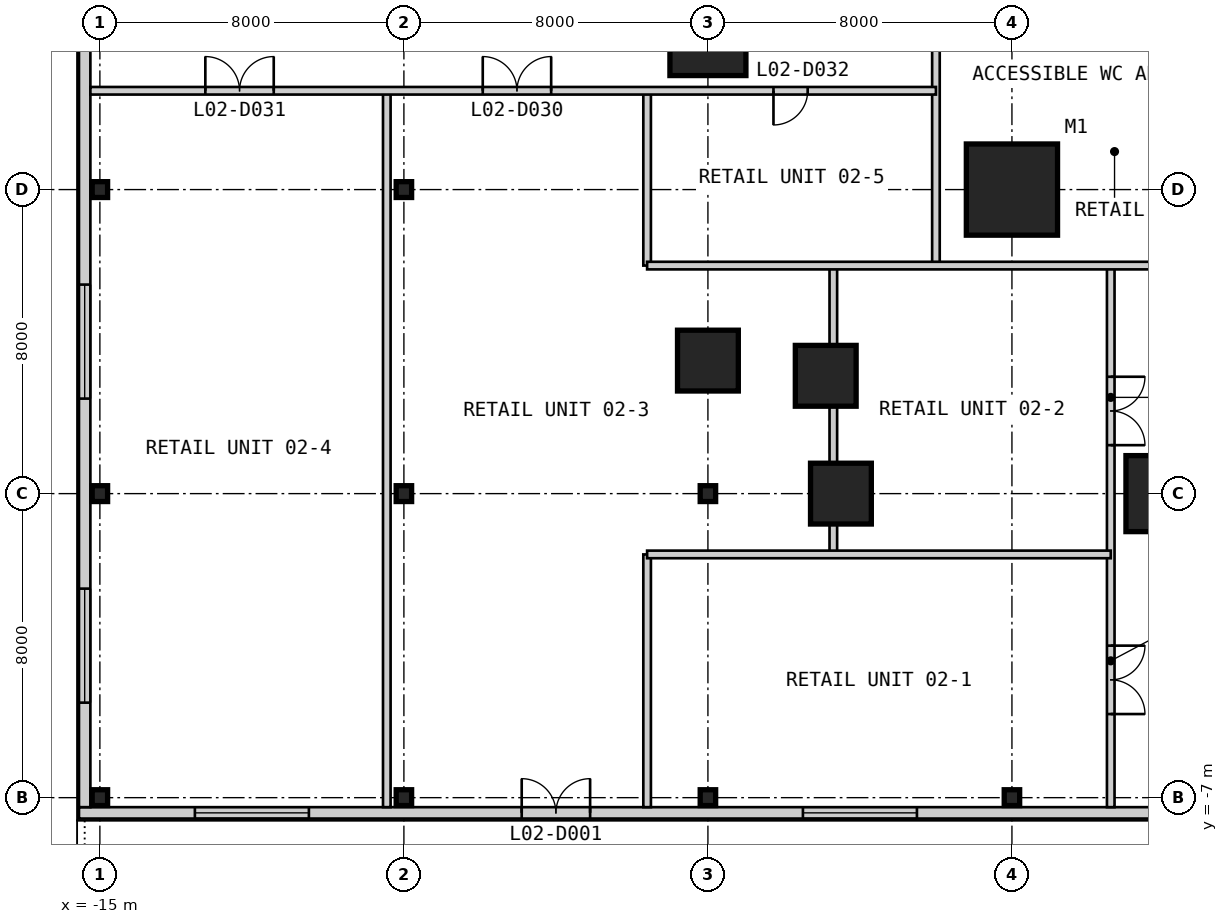
"""IFC4 building model, lengths in metres.
Left out: names, types, materials, properties, quantities, classifications, styles, units other than length and angle.
Written with IfcOpenShell. Run it as: python <this file> out.ifc"""

import sys

from ifc_helpers import new_model, si_unit, direction, frame, frame_2d, origin, origin_2d, place, context, subcontext, project, spatial, rectangle, i_section, extrude, element, fill, save


model = new_model("IFC4")
c1 = context("Model", 3, precision=1e-05, world=origin(), true_north=direction((0.0, 1.0)))
c2 = subcontext(c1, "Body", "Model", "MODEL_VIEW")
j1 = project(units=[si_unit("LENGTHUNIT", "METRE"), si_unit("PLANEANGLEUNIT", "RADIAN")], contexts=[c1])
p1 = place(None, origin())
s1 = spatial("IfcSite", under=j1, at=p1, CompositionType="ELEMENT")
p2 = place(p1, origin())
s2 = spatial("IfcBuilding", under=s1, at=p2, CompositionType="ELEMENT")
p3 = place(p2, frame((0.0, 0.0, 11.8)))
s3 = spatial("IfcBuildingStorey", under=s2, at=p3, CompositionType="ELEMENT", Elevation=11.8)
p4 = place(p3, frame((9.0, 9.0, 0.0), z_axis=(0.0, 0.0, 1.0), x_axis=(1.0, 0.0, 0.0)))
e1 = element("IfcColumn", 1, at=p4, inside=s3, PredefinedType="COLUMN", context=c2, shape_type="SweptSolid", body=[
    extrude(rectangle(XDim=2.4, YDim=2.4, at=origin_2d()), origin(), (0.0, 0.0, 1.0), 4.8),
])
p5 = place(p3, frame((4.5, 1.0, 0.0), z_axis=(0.0, 0.0, 1.0), x_axis=(1.0, 0.0, 0.0)))
e2 = element("IfcColumn", 2, at=p5, inside=s3, PredefinedType="COLUMN", context=c2, shape_type="SweptSolid", body=[
    extrude(rectangle(XDim=1.6, YDim=1.6, at=origin_2d()), origin(), (0.0, 0.0, 1.0), 4.8),
])
for number, where, z_axis, x_axis in (
    (3, (13.0, 1.0, 0.0), (0.0, 0.0, 1.0), (1.0, 0.0, 0.0)),
    (4, (1.0, 13.0, 0.0), (0.0, 0.0, 1.0), (1.0, 0.0, 0.0)),
):
    element("IfcColumn", number, at=place(p3, frame(where, z_axis=z_axis, x_axis=x_axis)), inside=s3, PredefinedType="COLUMN", context=c2, shape_type="SweptSolid", body=[
        extrude(rectangle(XDim=2.0, YDim=2.0, at=origin_2d()), origin(), (0.0, 0.0, 1.0), 4.8),
    ])
for number, where, z_axis, x_axis in (
    (5, (1.0, 4.5, 0.0), (0.0, 0.0, 1.0), (1.0, 0.0, 0.0)),
    (6, (4.1, 4.1, 0.0), (0.0, 0.0, 1.0), (1.0, 0.0, 0.0)),
):
    element("IfcColumn", number, at=place(p3, frame(where, z_axis=z_axis, x_axis=x_axis)), inside=s3, PredefinedType="COLUMN", context=c2, shape_type="SweptSolid", body=[
        extrude(rectangle(XDim=1.6, YDim=1.6, at=origin_2d()), origin(), (0.0, 0.0, 1.0), 4.8),
    ])
for number, where, z_axis, x_axis in (
    (7, (-15.0, -7.0, 0.0), (0.0, 0.0, 1.0), (1.0, 0.0, 0.0)),
    (8, (-15.0, 1.0, 0.0), (0.0, 0.0, 1.0), (1.0, 0.0, 0.0)),
    (9, (-15.0, 9.0, 0.0), (0.0, 0.0, 1.0), (1.0, 0.0, 0.0)),
    (10, (-7.0, -7.0, 0.0), (0.0, 0.0, 1.0), (1.0, 0.0, 0.0)),
    (11, (-7.0, 1.0, 0.0), (0.0, 0.0, 1.0), (1.0, 0.0, 0.0)),
    (12, (-7.0, 9.0, 0.0), (0.0, 0.0, 1.0), (1.0, 0.0, 0.0)),
    (13, (1.0, -7.0, 0.0), (0.0, 0.0, 1.0), (1.0, 0.0, 0.0)),
    (14, (1.0, 1.0, 0.0), (0.0, 0.0, 1.0), (1.0, 0.0, 0.0)),
    (15, (9.0, -7.0, 0.0), (0.0, 0.0, 1.0), (1.0, 0.0, 0.0)),
):
    element("IfcColumn", number, at=place(p3, frame(where, z_axis=z_axis, x_axis=x_axis)), inside=s3, PredefinedType="COLUMN", context=c2, shape_type="SweptSolid", body=[
        extrude(i_section(OverallWidth=0.406, OverallDepth=0.417, WebThickness=0.03, FlangeThickness=0.048, at=origin_2d()), origin(), (0.0, 0.0, 1.0), 4.8),
    ])
p6 = place(p3, frame((-15.55, -7.4, 0.0), z_axis=(0.0, 0.0, 1.0), x_axis=(1.0, 0.0, 0.0)))
e16 = element("IfcWall", 16, at=p6, inside=s3, PredefinedType="SOLIDWALL", context=c2, shape_type="SweptSolid", body=[
    extrude(rectangle(XDim=73.1, YDim=0.3, at=frame_2d((36.55, 0.0))), origin(), (0.0, 0.0, 1.0), 4.5),
])
p7 = place(p6, frame((11.65, 0.0, 0.0)))
e17 = element("IfcOpeningElement", 17, at=p7, cuts=e16, PredefinedType="OPENING", context=c2, shape_type="SweptSolid", body=[
    extrude(rectangle(XDim=1.8, YDim=2.4, at=frame_2d((0.9, 1.2))), frame((0.0, 0.16, 0.0), z_axis=(0.0, -1.0, 0.0), x_axis=(1.0, 0.0, 0.0)), (0.0, 0.0, 1.0), 0.32),
])
p8 = place(p6, frame((45.65, 0.0, 0.0)))
e18 = element("IfcOpeningElement", 18, at=p8, cuts=e16, PredefinedType="OPENING", context=c2, shape_type="SweptSolid", body=[
    extrude(rectangle(XDim=1.8, YDim=2.4, at=frame_2d((0.9, 1.2))), frame((0.0, 0.16, 0.0), z_axis=(0.0, -1.0, 0.0), x_axis=(1.0, 0.0, 0.0)), (0.0, 0.0, 1.0), 0.32),
])
p9 = place(p6, frame((3.05, 0.0, 0.9)))
e19 = element("IfcOpeningElement", 19, at=p9, cuts=e16, PredefinedType="OPENING", context=c2, shape_type="SweptSolid", body=[
    extrude(rectangle(XDim=3.0, YDim=2.4, at=frame_2d((1.5, 1.2))), frame((0.0, 0.16, 0.0), z_axis=(0.0, -1.0, 0.0), x_axis=(1.0, 0.0, 0.0)), (0.0, 0.0, 1.0), 0.32),
])
p10 = place(p6, frame((19.05, 0.0, 0.9)))
e20 = element("IfcOpeningElement", 20, at=p10, cuts=e16, PredefinedType="OPENING", context=c2, shape_type="SweptSolid", body=[
    extrude(rectangle(XDim=3.0, YDim=2.4, at=frame_2d((1.5, 1.2))), frame((0.0, 0.16, 0.0), z_axis=(0.0, -1.0, 0.0), x_axis=(1.0, 0.0, 0.0)), (0.0, 0.0, 1.0), 0.32),
])
p11 = place(p6, frame((33.05, 0.0, 0.9)))
e21 = element("IfcOpeningElement", 21, at=p11, cuts=e16, PredefinedType="OPENING", context=c2, shape_type="SweptSolid", body=[
    extrude(rectangle(XDim=3.0, YDim=2.4, at=frame_2d((1.5, 1.2))), frame((0.0, 0.16, 0.0), z_axis=(0.0, -1.0, 0.0), x_axis=(1.0, 0.0, 0.0)), (0.0, 0.0, 1.0), 0.32),
])
p12 = place(p6, frame((53.55, 0.0, 0.9)))
e22 = element("IfcOpeningElement", 22, at=p12, cuts=e16, PredefinedType="OPENING", context=c2, shape_type="SweptSolid", body=[
    extrude(rectangle(XDim=3.0, YDim=2.4, at=frame_2d((1.5, 1.2))), frame((0.0, 0.16, 0.0), z_axis=(0.0, -1.0, 0.0), x_axis=(1.0, 0.0, 0.0)), (0.0, 0.0, 1.0), 0.32),
])
p13 = place(p6, frame((59.55, 0.0, 0.9)))
e23 = element("IfcOpeningElement", 23, at=p13, cuts=e16, PredefinedType="OPENING", context=c2, shape_type="SweptSolid", body=[
    extrude(rectangle(XDim=3.0, YDim=2.4, at=frame_2d((1.5, 1.2))), frame((0.0, 0.16, 0.0), z_axis=(0.0, -1.0, 0.0), x_axis=(1.0, 0.0, 0.0)), (0.0, 0.0, 1.0), 0.32),
])
p14 = place(p6, frame((67.05, 0.0, 0.9)))
e24 = element("IfcOpeningElement", 24, at=p14, cuts=e16, PredefinedType="OPENING", context=c2, shape_type="SweptSolid", body=[
    extrude(rectangle(XDim=3.0, YDim=2.4, at=frame_2d((1.5, 1.2))), frame((0.0, 0.16, 0.0), z_axis=(0.0, -1.0, 0.0), x_axis=(1.0, 0.0, 0.0)), (0.0, 0.0, 1.0), 0.32),
])
p15 = place(p3, frame((-15.4, 65.25, 0.0), z_axis=(0.0, 0.0, 1.0), x_axis=(0.0, -1.0, 0.0)))
e25 = element("IfcWall", 25, at=p15, inside=s3, PredefinedType="SOLIDWALL", context=c2, shape_type="SweptSolid", body=[
    extrude(rectangle(XDim=72.5, YDim=0.3, at=frame_2d((36.25, 0.0))), origin(), (0.0, 0.0, 1.0), 4.5),
])
p16 = place(p15, frame((66.75, 0.0, 0.9)))
e26 = element("IfcOpeningElement", 26, at=p16, cuts=e25, PredefinedType="OPENING", context=c2, shape_type="SweptSolid", body=[
    extrude(rectangle(XDim=3.0, YDim=2.4, at=frame_2d((1.5, 1.2))), frame((0.0, 0.16, 0.0), z_axis=(0.0, -1.0, 0.0), x_axis=(1.0, 0.0, 0.0)), (0.0, 0.0, 1.0), 0.32),
])
p17 = place(p15, frame((58.75, 0.0, 0.9)))
e27 = element("IfcOpeningElement", 27, at=p17, cuts=e25, PredefinedType="OPENING", context=c2, shape_type="SweptSolid", body=[
    extrude(rectangle(XDim=3.0, YDim=2.4, at=frame_2d((1.5, 1.2))), frame((0.0, 0.16, 0.0), z_axis=(0.0, -1.0, 0.0), x_axis=(1.0, 0.0, 0.0)), (0.0, 0.0, 1.0), 0.32),
])
p18 = place(p15, frame((44.75, 0.0, 0.9)))
e28 = element("IfcOpeningElement", 28, at=p18, cuts=e25, PredefinedType="OPENING", context=c2, shape_type="SweptSolid", body=[
    extrude(rectangle(XDim=3.0, YDim=2.4, at=frame_2d((1.5, 1.2))), frame((0.0, 0.16, 0.0), z_axis=(0.0, -1.0, 0.0), x_axis=(1.0, 0.0, 0.0)), (0.0, 0.0, 1.0), 0.32),
])
p19 = place(p15, frame((32.75, 0.0, 0.9)))
e29 = element("IfcOpeningElement", 29, at=p19, cuts=e25, PredefinedType="OPENING", context=c2, shape_type="SweptSolid", body=[
    extrude(rectangle(XDim=3.0, YDim=2.4, at=frame_2d((1.5, 1.2))), frame((0.0, 0.16, 0.0), z_axis=(0.0, -1.0, 0.0), x_axis=(1.0, 0.0, 0.0)), (0.0, 0.0, 1.0), 0.32),
])
p20 = place(p15, frame((24.25, 0.0, 0.9)))
e30 = element("IfcOpeningElement", 30, at=p20, cuts=e25, PredefinedType="OPENING", context=c2, shape_type="SweptSolid", body=[
    extrude(rectangle(XDim=3.0, YDim=2.4, at=frame_2d((1.5, 1.2))), frame((0.0, 0.16, 0.0), z_axis=(0.0, -1.0, 0.0), x_axis=(1.0, 0.0, 0.0)), (0.0, 0.0, 1.0), 0.32),
])
p21 = place(p15, frame((18.25, 0.0, 0.9)))
e31 = element("IfcOpeningElement", 31, at=p21, cuts=e25, PredefinedType="OPENING", context=c2, shape_type="SweptSolid", body=[
    extrude(rectangle(XDim=3.0, YDim=2.4, at=frame_2d((1.5, 1.2))), frame((0.0, 0.16, 0.0), z_axis=(0.0, -1.0, 0.0), x_axis=(1.0, 0.0, 0.0)), (0.0, 0.0, 1.0), 0.32),
])
p22 = place(p15, frame((10.75, 0.0, 0.9)))
e32 = element("IfcOpeningElement", 32, at=p22, cuts=e25, PredefinedType="OPENING", context=c2, shape_type="SweptSolid", body=[
    extrude(rectangle(XDim=3.0, YDim=2.4, at=frame_2d((1.5, 1.2))), frame((0.0, 0.16, 0.0), z_axis=(0.0, -1.0, 0.0), x_axis=(1.0, 0.0, 0.0)), (0.0, 0.0, 1.0), 0.32),
])
p23 = place(p15, frame((2.75, 0.0, 0.9)))
e33 = element("IfcOpeningElement", 33, at=p23, cuts=e25, PredefinedType="OPENING", context=c2, shape_type="SweptSolid", body=[
    extrude(rectangle(XDim=3.0, YDim=2.4, at=frame_2d((1.5, 1.2))), frame((0.0, 0.16, 0.0), z_axis=(0.0, -1.0, 0.0), x_axis=(1.0, 0.0, 0.0)), (0.0, 0.0, 1.0), 0.32),
])
p24 = place(p3, frame((-7.45, -7.25, 0.0), z_axis=(0.0, 0.0, 1.0), x_axis=(0.0, 1.0, 0.0)))
e34 = element("IfcWall", 34, at=p24, inside=s3, PredefinedType="PARTITIONING", context=c2, shape_type="SweptSolid", body=[
    extrude(rectangle(XDim=18.85, YDim=0.2, at=frame_2d((9.425, 0.0))), origin(), (0.0, 0.0, 1.0), 4.5),
])
p25 = place(p3, frame((-0.6, -7.25, 0.0), z_axis=(0.0, 0.0, 1.0), x_axis=(0.0, 1.0, 0.0)))
e35 = element("IfcWall", 35, at=p25, inside=s3, PredefinedType="PARTITIONING", context=c2, shape_type="SweptSolid", body=[
    extrude(rectangle(XDim=6.65, YDim=0.2, at=frame_2d((3.325, 0.0))), origin(), (0.0, 0.0, 1.0), 4.5),
])
p26 = place(p3, frame((-0.6, 7.0, 0.0), z_axis=(0.0, 0.0, 1.0), x_axis=(0.0, 1.0, 0.0)))
e36 = element("IfcWall", 36, at=p26, inside=s3, PredefinedType="PARTITIONING", context=c2, shape_type="SweptSolid", body=[
    extrude(rectangle(XDim=4.6, YDim=0.2, at=frame_2d((2.3, 0.0))), origin(), (0.0, 0.0, 1.0), 4.5),
])
p27 = place(p3, frame((4.3, -0.6, 0.0), z_axis=(0.0, 0.0, 1.0), x_axis=(0.0, 1.0, 0.0)))
e37 = element("IfcWall", 37, at=p27, inside=s3, PredefinedType="PARTITIONING", context=c2, shape_type="SweptSolid", body=[
    extrude(rectangle(XDim=0.8, YDim=0.2, at=frame_2d((0.4, 0.0))), origin(), (0.0, 0.0, 1.0), 4.5),
])
p28 = place(p3, frame((4.3, 1.8, 0.0), z_axis=(0.0, 0.0, 1.0), x_axis=(0.0, 1.0, 0.0)))
e38 = element("IfcWall", 38, at=p28, inside=s3, PredefinedType="PARTITIONING", context=c2, shape_type="SweptSolid", body=[
    extrude(rectangle(XDim=1.5, YDim=0.2, at=frame_2d((0.75, 0.0))), origin(), (0.0, 0.0, 1.0), 3.65),
])
p29 = place(p3, frame((4.3, 4.9, 0.0), z_axis=(0.0, 0.0, 1.0), x_axis=(0.0, 1.0, 0.0)))
e39 = element("IfcWall", 39, at=p29, inside=s3, PredefinedType="PARTITIONING", context=c2, shape_type="SweptSolid", body=[
    extrude(rectangle(XDim=2.1, YDim=0.2, at=frame_2d((1.05, 0.0))), origin(), (0.0, 0.0, 1.0), 4.5),
])
p30 = place(p3, frame((7.0, 7.0, 0.0), z_axis=(0.0, 0.0, 1.0), x_axis=(0.0, 1.0, 0.0)))
e40 = element("IfcWall", 40, at=p30, inside=s3, PredefinedType="PARTITIONING", context=c2, shape_type="SweptSolid", body=[
    extrude(rectangle(XDim=6.0, YDim=0.2, at=frame_2d((3.0, 0.0))), origin(), (0.0, 0.0, 1.0), 4.5),
])
p31 = place(p3, frame((11.6, -7.25, 0.0), z_axis=(0.0, 0.0, 1.0), x_axis=(0.0, 1.0, 0.0)))
e41 = element("IfcWall", 41, at=p31, inside=s3, PredefinedType="PARTITIONING", context=c2, shape_type="SweptSolid", body=[
    extrude(rectangle(XDim=14.25, YDim=0.2, at=frame_2d((7.125, 0.0))), origin(), (0.0, 0.0, 1.0), 4.5),
])
p32 = place(p31, frame((2.45, 0.0, 0.0)))
e42 = element("IfcOpeningElement", 42, at=p32, cuts=e41, PredefinedType="OPENING", context=c2, shape_type="SweptSolid", body=[
    extrude(rectangle(XDim=1.8, YDim=2.4, at=frame_2d((0.9, 1.2))), frame((0.0, 0.11, 0.0), z_axis=(0.0, -1.0, 0.0), x_axis=(1.0, 0.0, 0.0)), (0.0, 0.0, 1.0), 0.22),
])
p33 = place(p31, frame((9.525, 0.0, 0.0)))
e43 = element("IfcOpeningElement", 43, at=p33, cuts=e41, PredefinedType="OPENING", context=c2, shape_type="SweptSolid", body=[
    extrude(rectangle(XDim=1.8, YDim=2.4, at=frame_2d((0.9, 1.2))), frame((0.0, 0.11, 0.0), z_axis=(0.0, -1.0, 0.0), x_axis=(1.0, 0.0, 0.0)), (0.0, 0.0, 1.0), 0.22),
])
p34 = place(p3, frame((-0.6, -0.6, 0.0), z_axis=(0.0, 0.0, 1.0), x_axis=(1.0, 0.0, 0.0)))
e44 = element("IfcWall", 44, at=p34, inside=s3, PredefinedType="PARTITIONING", context=c2, shape_type="SweptSolid", body=[
    extrude(rectangle(XDim=12.2, YDim=0.2, at=frame_2d((6.1, 0.0))), origin(), (0.0, 0.0, 1.0), 4.5),
])
p35 = place(p3, frame((-0.6, 7.0, 0.0), z_axis=(0.0, 0.0, 1.0), x_axis=(1.0, 0.0, 0.0)))
e45 = element("IfcWall", 45, at=p35, inside=s3, PredefinedType="PARTITIONING", context=c2, shape_type="SweptSolid", body=[
    extrude(rectangle(XDim=17.0, YDim=0.2, at=frame_2d((8.5, 0.0))), origin(), (0.0, 0.0, 1.0), 4.5),
])
p36 = place(p35, frame((14.125, 0.0, 0.0)))
e46 = element("IfcOpeningElement", 46, at=p36, cuts=e45, PredefinedType="OPENING", context=c2, shape_type="SweptSolid", body=[
    extrude(rectangle(XDim=0.9, YDim=2.2, at=frame_2d((0.45, 1.1))), frame((0.0, 0.11, 0.0), z_axis=(0.0, -1.0, 0.0), x_axis=(1.0, 0.0, 0.0)), (0.0, 0.0, 1.0), 0.22),
])
p37 = place(p3, frame((-15.25, 11.6, 0.0), z_axis=(0.0, 0.0, 1.0), x_axis=(1.0, 0.0, 0.0)))
e47 = element("IfcWall", 47, at=p37, inside=s3, PredefinedType="PARTITIONING", context=c2, shape_type="SweptSolid", body=[
    extrude(rectangle(XDim=22.25, YDim=0.2, at=frame_2d((11.125, 0.0))), origin(), (0.0, 0.0, 1.0), 4.5),
])
p38 = place(p37, frame((10.325, 0.0, 0.0)))
e48 = element("IfcOpeningElement", 48, at=p38, cuts=e47, PredefinedType="OPENING", context=c2, shape_type="SweptSolid", body=[
    extrude(rectangle(XDim=1.8, YDim=2.4, at=frame_2d((0.9, 1.2))), frame((0.0, 0.11, 0.0), z_axis=(0.0, -1.0, 0.0), x_axis=(1.0, 0.0, 0.0)), (0.0, 0.0, 1.0), 0.22),
])
p39 = place(p37, frame((3.025, 0.0, 0.0)))
e49 = element("IfcOpeningElement", 49, at=p39, cuts=e47, PredefinedType="OPENING", context=c2, shape_type="SweptSolid", body=[
    extrude(rectangle(XDim=1.8, YDim=2.4, at=frame_2d((0.9, 1.2))), frame((0.0, 0.11, 0.0), z_axis=(0.0, -1.0, 0.0), x_axis=(1.0, 0.0, 0.0)), (0.0, 0.0, 1.0), 0.22),
])
p40 = place(p37, frame((17.975, 0.0, 0.0)))
e50 = element("IfcOpeningElement", 50, at=p40, cuts=e47, PredefinedType="OPENING", context=c2, shape_type="SweptSolid", body=[
    extrude(rectangle(XDim=0.9, YDim=2.2, at=frame_2d((0.45, 1.1))), frame((0.0, 0.11, 0.0), z_axis=(0.0, -1.0, 0.0), x_axis=(1.0, 0.0, 0.0)), (0.0, 0.0, 1.0), 0.22),
])
p41 = place(p7, origin())
e51 = element("IfcDoor", 51, at=p41, inside=s3, OperationType="DOUBLE_DOOR_SINGLE_SWING", PredefinedType="DOOR", context=c2, shape_type="SweptSolid", body=[
    extrude(rectangle(XDim=1.8, YDim=2.4, at=frame_2d((0.9, 1.2))), frame((0.0, 0.025, 0.0), z_axis=(0.0, -1.0, 0.0), x_axis=(1.0, 0.0, 0.0)), (0.0, 0.0, 1.0), 0.05),
])
fill(e17, e51)
p42 = place(p9, origin())
e52 = element("IfcWindow", 52, at=p42, inside=s3, PartitioningType="SINGLE_PANEL", PredefinedType="WINDOW", context=c2, shape_type="SweptSolid", body=[
    extrude(rectangle(XDim=3.0, YDim=2.4, at=frame_2d((1.5, 1.2))), frame((0.0, 0.03, 0.0), z_axis=(0.0, -1.0, 0.0), x_axis=(1.0, 0.0, 0.0)), (0.0, 0.0, 1.0), 0.06),
])
fill(e19, e52)
p43 = place(p10, origin())
e53 = element("IfcWindow", 53, at=p43, inside=s3, PartitioningType="SINGLE_PANEL", PredefinedType="WINDOW", context=c2, shape_type="SweptSolid", body=[
    extrude(rectangle(XDim=3.0, YDim=2.4, at=frame_2d((1.5, 1.2))), frame((0.0, 0.03, 0.0), z_axis=(0.0, -1.0, 0.0), x_axis=(1.0, 0.0, 0.0)), (0.0, 0.0, 1.0), 0.06),
])
fill(e20, e53)
p44 = place(p16, origin())
e54 = element("IfcWindow", 54, at=p44, inside=s3, PartitioningType="SINGLE_PANEL", PredefinedType="WINDOW", context=c2, shape_type="SweptSolid", body=[
    extrude(rectangle(XDim=3.0, YDim=2.4, at=frame_2d((1.5, 1.2))), frame((0.0, 0.03, 0.0), z_axis=(0.0, -1.0, 0.0), x_axis=(1.0, 0.0, 0.0)), (0.0, 0.0, 1.0), 0.06),
])
fill(e26, e54)
p45 = place(p17, origin())
e55 = element("IfcWindow", 55, at=p45, inside=s3, PartitioningType="SINGLE_PANEL", PredefinedType="WINDOW", context=c2, shape_type="SweptSolid", body=[
    extrude(rectangle(XDim=3.0, YDim=2.4, at=frame_2d((1.5, 1.2))), frame((0.0, 0.03, 0.0), z_axis=(0.0, -1.0, 0.0), x_axis=(1.0, 0.0, 0.0)), (0.0, 0.0, 1.0), 0.06),
])
fill(e27, e55)
p46 = place(p32, frame((1.8, 0.0, 0.0), z_axis=(0.0, 0.0, 1.0), x_axis=(-1.0, 0.0, 0.0)))
e56 = element("IfcDoor", 56, at=p46, inside=s3, OperationType="DOUBLE_DOOR_SINGLE_SWING", PredefinedType="DOOR", context=c2, shape_type="SweptSolid", body=[
    extrude(rectangle(XDim=1.8, YDim=2.4, at=frame_2d((0.9, 1.2))), frame((0.0, 0.025, 0.0), z_axis=(0.0, -1.0, 0.0), x_axis=(1.0, 0.0, 0.0)), (0.0, 0.0, 1.0), 0.05),
])
fill(e42, e56)
p47 = place(p33, frame((1.8, 0.0, 0.0), z_axis=(0.0, 0.0, 1.0), x_axis=(-1.0, 0.0, 0.0)))
e57 = element("IfcDoor", 57, at=p47, inside=s3, OperationType="DOUBLE_DOOR_SINGLE_SWING", PredefinedType="DOOR", context=c2, shape_type="SweptSolid", body=[
    extrude(rectangle(XDim=1.8, YDim=2.4, at=frame_2d((0.9, 1.2))), frame((0.0, 0.025, 0.0), z_axis=(0.0, -1.0, 0.0), x_axis=(1.0, 0.0, 0.0)), (0.0, 0.0, 1.0), 0.05),
])
fill(e43, e57)
p48 = place(p38, origin())
e58 = element("IfcDoor", 58, at=p48, inside=s3, OperationType="DOUBLE_DOOR_SINGLE_SWING", PredefinedType="DOOR", context=c2, shape_type="SweptSolid", body=[
    extrude(rectangle(XDim=1.8, YDim=2.4, at=frame_2d((0.9, 1.2))), frame((0.0, 0.025, 0.0), z_axis=(0.0, -1.0, 0.0), x_axis=(1.0, 0.0, 0.0)), (0.0, 0.0, 1.0), 0.05),
])
fill(e48, e58)
p49 = place(p39, origin())
e59 = element("IfcDoor", 59, at=p49, inside=s3, OperationType="DOUBLE_DOOR_SINGLE_SWING", PredefinedType="DOOR", context=c2, shape_type="SweptSolid", body=[
    extrude(rectangle(XDim=1.8, YDim=2.4, at=frame_2d((0.9, 1.2))), frame((0.0, 0.025, 0.0), z_axis=(0.0, -1.0, 0.0), x_axis=(1.0, 0.0, 0.0)), (0.0, 0.0, 1.0), 0.05),
])
fill(e49, e59)
p50 = place(p40, frame((0.9, 0.0, 0.0), z_axis=(0.0, 0.0, 1.0), x_axis=(-1.0, 0.0, 0.0)))
e60 = element("IfcDoor", 60, at=p50, inside=s3, OperationType="SINGLE_SWING_RIGHT", PredefinedType="DOOR", context=c2, shape_type="SweptSolid", body=[
    extrude(rectangle(XDim=0.9, YDim=2.2, at=frame_2d((0.45, 1.1))), frame((0.0, 0.025, 0.0), z_axis=(0.0, -1.0, 0.0), x_axis=(1.0, 0.0, 0.0)), (0.0, 0.0, 1.0), 0.05),
])
fill(e50, e60)
save(model, sys.argv[1])
